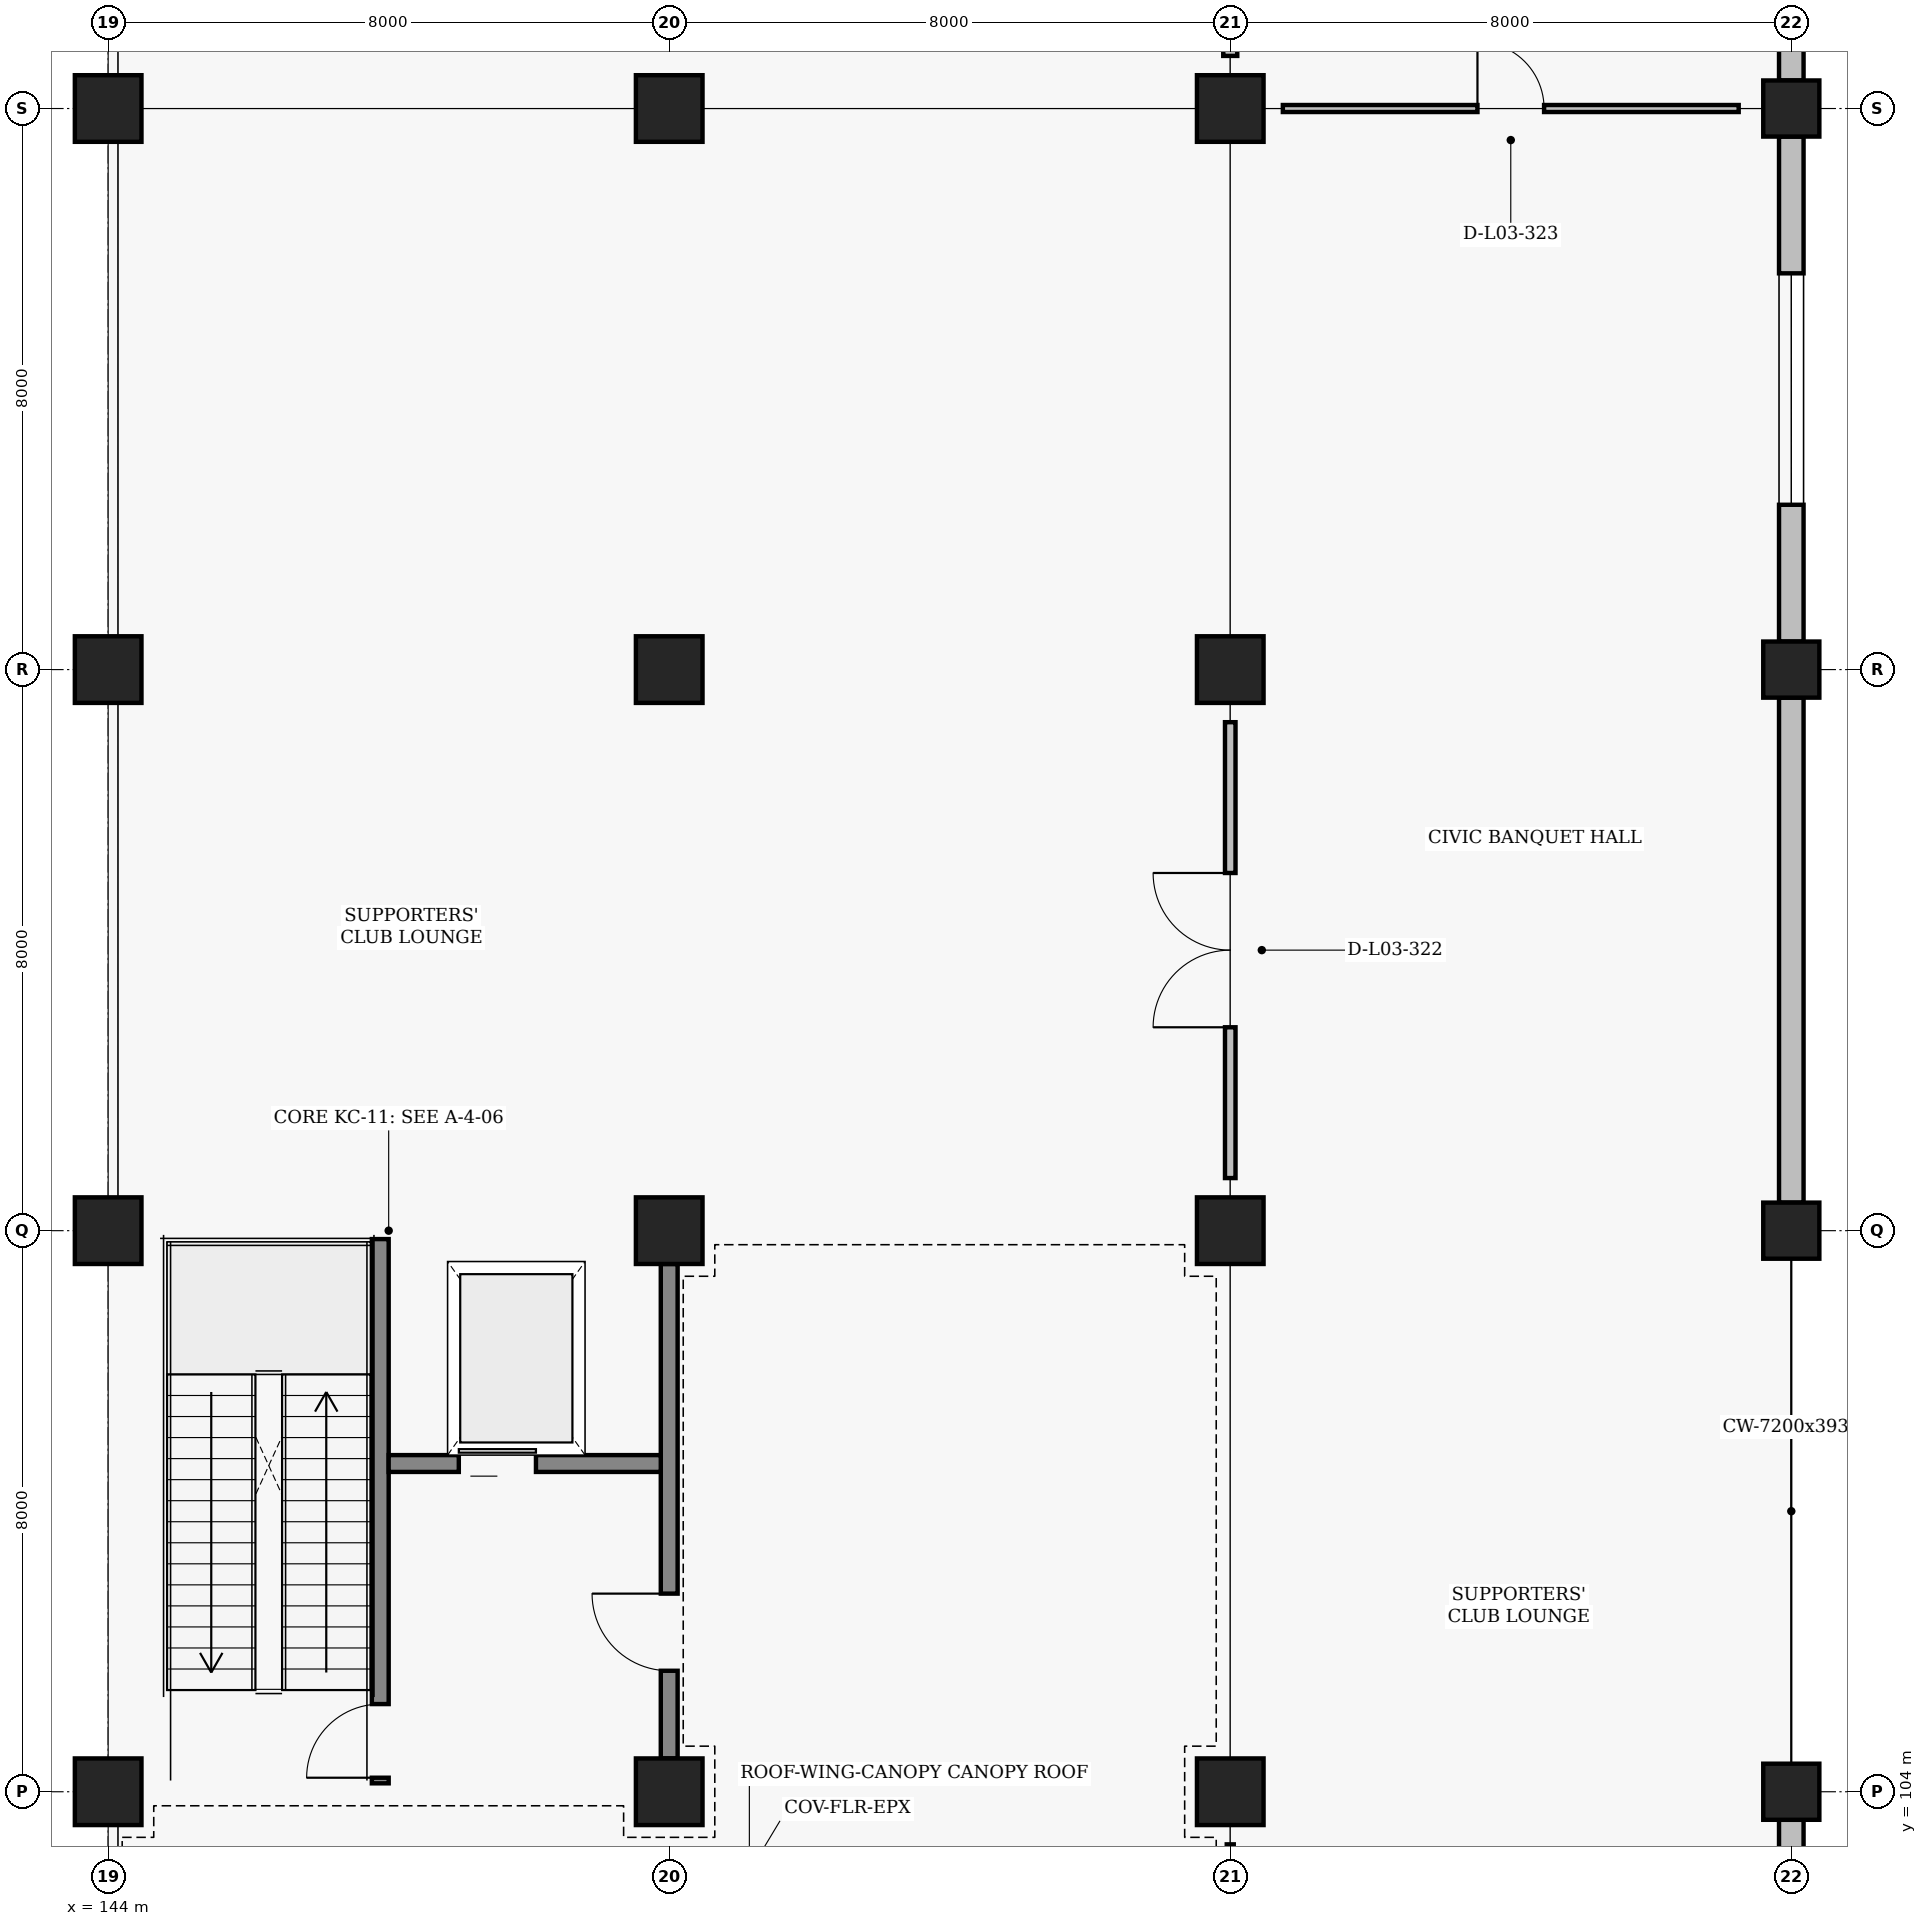
"""IFC4 building model, lengths in metres.
Left out: names, types, materials, properties, quantities, classifications, styles, units other than length and angle.
Written with IfcOpenShell. Run it as: python <this file> out.ifc"""

import sys

from ifc_helpers import new_model, si_unit, direction, frame, frame_2d, origin, origin_2d, place, context, subcontext, project, spatial, rectangle, extrude, element, fill, save


model = new_model("IFC4")
c1 = context("Model", 3, precision=1e-05, world=origin(), true_north=direction((0.0, 1.0)))
c2 = subcontext(c1, "Body", "Model", "MODEL_VIEW")
j1 = project(units=[si_unit("LENGTHUNIT", "METRE"), si_unit("PLANEANGLEUNIT", "RADIAN")], contexts=[c1])
p1 = place(None, origin())
s1 = spatial("IfcSite", under=j1, at=p1, CompositionType="ELEMENT")
p2 = place(p1, origin())
s2 = spatial("IfcBuilding", under=s1, at=p2, CompositionType="ELEMENT")
p3 = place(p2, frame((0.0, 0.0, 9.6)))
s3 = spatial("IfcBuildingStorey", under=s2, at=p3, CompositionType="ELEMENT", Elevation=9.6)
for number, where, z_axis, x_axis in (
    (1, (144.0, 104.0, 0.0), (0.0, 0.0, 1.0), (1.0, 0.0, 0.0)),
    (2, (144.0, 112.0, 0.0), (0.0, 0.0, 1.0), (1.0, 0.0, 0.0)),
    (3, (144.0, 120.0, 0.0), (0.0, 0.0, 1.0), (1.0, 0.0, 0.0)),
    (4, (144.0, 128.0, 0.0), (0.0, 0.0, 1.0), (1.0, 0.0, 0.0)),
    (5, (152.0, 104.0, 0.0), (0.0, 0.0, 1.0), (1.0, 0.0, 0.0)),
    (6, (152.0, 112.0, 0.0), (0.0, 0.0, 1.0), (1.0, 0.0, 0.0)),
    (7, (152.0, 120.0, 0.0), (0.0, 0.0, 1.0), (1.0, 0.0, 0.0)),
    (8, (152.0, 128.0, 0.0), (0.0, 0.0, 1.0), (1.0, 0.0, 0.0)),
    (9, (160.0, 104.0, 0.0), (0.0, 0.0, 1.0), (1.0, 0.0, 0.0)),
    (10, (160.0, 112.0, 0.0), (0.0, 0.0, 1.0), (1.0, 0.0, 0.0)),
    (11, (160.0, 120.0, 0.0), (0.0, 0.0, 1.0), (1.0, 0.0, 0.0)),
    (12, (160.0, 128.0, 0.0), (0.0, 0.0, 1.0), (1.0, 0.0, 0.0)),
):
    element("IfcColumn", number, at=place(p3, frame(where, z_axis=z_axis, x_axis=x_axis)), inside=s3, PredefinedType="COLUMN", context=c2, shape_type="SweptSolid", body=[
        extrude(rectangle(XDim=0.95, YDim=0.95, at=origin_2d()), origin(), (0.0, 0.0, 1.0), 4.8),
    ])
for number, where, z_axis, x_axis in (
    (13, (168.0, 104.0, 0.0), (0.0, 0.0, 1.0), (1.0, 0.0, 0.0)),
    (14, (168.0, 112.0, 0.0), (0.0, 0.0, 1.0), (1.0, 0.0, 0.0)),
    (15, (168.0, 120.0, 0.0), (0.0, 0.0, 1.0), (1.0, 0.0, 0.0)),
    (16, (168.0, 128.0, 0.0), (0.0, 0.0, 1.0), (1.0, 0.0, 0.0)),
):
    element("IfcColumn", number, at=place(p3, frame(where, z_axis=z_axis, x_axis=x_axis)), inside=s3, PredefinedType="COLUMN", context=c2, shape_type="SweptSolid", body=[
        extrude(rectangle(XDim=0.8, YDim=0.8, at=origin_2d()), origin(), (0.0, 0.0, 1.0), 4.8),
    ])
p4 = place(p3, frame((168.0, 96.4, 0.0), z_axis=(0.0, 0.0, 1.0), x_axis=(0.0, 1.0, 0.0)))
e17 = element("IfcWall", 17, at=p4, inside=s3, PredefinedType="SOLIDWALL", context=c2, shape_type="SweptSolid", body=[
    extrude(rectangle(XDim=7.2, YDim=0.35, at=frame_2d((3.6, 0.0))), origin(), (0.0, 0.0, 1.0), 3.68),
])
p5 = place(p3, frame((168.0, 112.4, 0.0), z_axis=(0.0, 0.0, 1.0), x_axis=(0.0, 1.0, 0.0)))
e18 = element("IfcWall", 18, at=p5, inside=s3, PredefinedType="SOLIDWALL", context=c2, shape_type="SweptSolid", body=[
    extrude(rectangle(XDim=7.2, YDim=0.35, at=frame_2d((3.6, 0.0))), origin(), (0.0, 0.0, 1.0), 3.93),
])
p6 = place(p3, frame((168.0, 120.4, 0.0), z_axis=(0.0, 0.0, 1.0), x_axis=(0.0, 1.0, 0.0)))
e19 = element("IfcWall", 19, at=p6, inside=s3, PredefinedType="SOLIDWALL", context=c2, shape_type="SweptSolid", body=[
    extrude(rectangle(XDim=7.2, YDim=0.35, at=frame_2d((3.6, 0.0))), origin(), (0.0, 0.0, 1.0), 3.93),
])
p7 = place(p6, frame((1.95, 0.0, 0.95)))
e20 = element("IfcOpeningElement", 20, at=p7, cuts=e19, PredefinedType="OPENING", context=c2, shape_type="SweptSolid", body=[
    extrude(rectangle(XDim=3.3, YDim=2.2, at=frame_2d((1.65, 1.1))), frame((0.0, 0.185, 0.0), z_axis=(0.0, -1.0, 0.0), x_axis=(1.0, 0.0, 0.0)), (0.0, 0.0, 1.0), 0.37),
])
p8 = place(p3, frame((168.0, 128.4, 0.0), z_axis=(0.0, 0.0, 1.0), x_axis=(0.0, 1.0, 0.0)))
e21 = element("IfcWall", 21, at=p8, inside=s3, PredefinedType="SOLIDWALL", context=c2, shape_type="SweptSolid", body=[
    extrude(rectangle(XDim=7.2, YDim=0.35, at=frame_2d((3.6, 0.0))), origin(), (0.0, 0.0, 1.0), 3.79),
])
p9 = place(p3, frame((152.0, 104.475, 0.0), z_axis=(0.0, 0.0, 1.0), x_axis=(0.0, 1.0, 0.0)))
e22 = element("IfcWall", 22, at=p9, inside=s3, PredefinedType="SHEAR", context=c2, shape_type="SweptSolid", body=[
    extrude(rectangle(XDim=7.05, YDim=0.24, at=frame_2d((3.525, 0.0))), origin(), (0.0, 0.0, 1.0), 3.68),
])
p10 = place(p9, frame((1.25, 0.0, 0.0)))
e23 = element("IfcOpeningElement", 23, at=p10, cuts=e22, PredefinedType="OPENING", context=c2, shape_type="SweptSolid", body=[
    extrude(rectangle(XDim=1.1, YDim=2.2, at=frame_2d((0.55, 1.1))), frame((0.0, 0.13, 0.0), z_axis=(0.0, -1.0, 0.0), x_axis=(1.0, 0.0, 0.0)), (0.0, 0.0, 1.0), 0.26),
])
p11 = place(p3, frame((147.88, 104.12, 0.0), z_axis=(0.0, 0.0, 1.0), x_axis=(0.0, 1.0, 0.0)))
e24 = element("IfcWall", 24, at=p11, inside=s3, PredefinedType="SHEAR", context=c2, shape_type="SweptSolid", body=[
    extrude(rectangle(XDim=7.76, YDim=0.24, at=frame_2d((3.88, 0.0))), origin(), (0.0, 0.0, 1.0), 4.03),
])
p12 = place(p11, frame((0.08, 0.0, 0.0)))
e25 = element("IfcOpeningElement", 25, at=p12, cuts=e24, PredefinedType="OPENING", context=c2, shape_type="SweptSolid", body=[
    extrude(rectangle(XDim=1.05, YDim=2.15, at=frame_2d((0.525, 1.075))), frame((0.0, 0.13, 0.0), z_axis=(0.0, -1.0, 0.0), x_axis=(1.0, 0.0, 0.0)), (0.0, 0.0, 1.0), 0.26),
])
p13 = place(p3, frame((148.0, 108.68, 0.0), z_axis=(0.0, 0.0, 1.0), x_axis=(1.0, 0.0, 0.0)))
e26 = element("IfcWall", 26, at=p13, inside=s3, PredefinedType="SHEAR", context=c2, shape_type="SweptSolid", body=[
    extrude(rectangle(XDim=3.88, YDim=0.24, at=frame_2d((1.94, 0.0))), origin(), (0.0, 0.0, 1.0), 3.93),
])
p14 = place(p13, frame((1.0, 0.0, 0.0)))
e27 = element("IfcOpeningElement", 27, at=p14, cuts=e26, PredefinedType="OPENING", context=c2, shape_type="SweptSolid", body=[
    extrude(rectangle(XDim=1.1, YDim=2.15, at=frame_2d((0.55, 1.075))), frame((0.0, 0.13, 0.0), z_axis=(0.0, -1.0, 0.0), x_axis=(1.0, 0.0, 0.0)), (0.0, 0.0, 1.0), 0.26),
])
p15 = place(p3, frame((160.0, 128.75, 0.0), z_axis=(0.0, 0.0, 1.0), x_axis=(0.0, 1.0, 0.0)))
e28 = element("IfcWall", 28, at=p15, inside=s3, PredefinedType="PARTITIONING", context=c2, shape_type="SweptSolid", body=[
    extrude(rectangle(XDim=6.5, YDim=0.2, at=frame_2d((3.25, 0.0))), origin(), (0.0, 0.0, 1.0), 3.93),
])
p16 = place(p3, frame((160.0, 96.75, 0.0), z_axis=(0.0, 0.0, 1.0), x_axis=(0.0, 1.0, 0.0)))
e29 = element("IfcWall", 29, at=p16, inside=s3, PredefinedType="PARTITIONING", context=c2, shape_type="SweptSolid", body=[
    extrude(rectangle(XDim=6.5, YDim=0.1, at=frame_2d((3.25, 0.0))), origin(), (0.0, 0.0, 1.0), 3.93),
])
p17 = place(p16, frame((2.775, 0.0, 0.0)))
e30 = element("IfcOpeningElement", 30, at=p17, cuts=e29, PredefinedType="OPENING", context=c2, shape_type="SweptSolid", body=[
    extrude(rectangle(XDim=0.95, YDim=2.1, at=frame_2d((0.475, 1.05))), frame((0.0, 0.06, 0.0), z_axis=(0.0, -1.0, 0.0), x_axis=(1.0, 0.0, 0.0)), (0.0, 0.0, 1.0), 0.12),
])
p18 = place(p3, frame((160.0, 112.75, 0.0), z_axis=(0.0, 0.0, 1.0), x_axis=(0.0, 1.0, 0.0)))
e31 = element("IfcWall", 31, at=p18, inside=s3, PredefinedType="PARTITIONING", context=c2, shape_type="SweptSolid", body=[
    extrude(rectangle(XDim=6.5, YDim=0.15, at=frame_2d((3.25, 0.0))), origin(), (0.0, 0.0, 1.0), 3.93),
])
p19 = place(p18, frame((2.15, 0.0, 0.0)))
e32 = element("IfcOpeningElement", 32, at=p19, cuts=e31, PredefinedType="OPENING", context=c2, shape_type="SweptSolid", body=[
    extrude(rectangle(XDim=2.2, YDim=2.4, at=frame_2d((1.1, 1.2))), frame((0.0, 0.085, 0.0), z_axis=(0.0, -1.0, 0.0), x_axis=(1.0, 0.0, 0.0)), (0.0, 0.0, 1.0), 0.17),
])
p20 = place(p3, frame((160.75, 128.0, 0.0), z_axis=(0.0, 0.0, 1.0), x_axis=(1.0, 0.0, 0.0)))
e33 = element("IfcWall", 33, at=p20, inside=s3, PredefinedType="PARTITIONING", context=c2, shape_type="SweptSolid", body=[
    extrude(rectangle(XDim=6.5, YDim=0.1, at=frame_2d((3.25, 0.0))), origin(), (0.0, 0.0, 1.0), 3.93),
])
p21 = place(p20, frame((2.775, 0.0, 0.0)))
e34 = element("IfcOpeningElement", 34, at=p21, cuts=e33, PredefinedType="OPENING", context=c2, shape_type="SweptSolid", body=[
    extrude(rectangle(XDim=0.95, YDim=2.1, at=frame_2d((0.475, 1.05))), frame((0.0, 0.06, 0.0), z_axis=(0.0, -1.0, 0.0), x_axis=(1.0, 0.0, 0.0)), (0.0, 0.0, 1.0), 0.12),
])
p22 = place(p7, origin())
e35 = element("IfcWindow", 35, at=p22, inside=s3, PartitioningType="SINGLE_PANEL", PredefinedType="WINDOW", context=c2, shape_type="SweptSolid", body=[
    extrude(rectangle(XDim=3.3, YDim=2.2, at=frame_2d((1.65, 1.1))), frame((0.0, 0.03, 0.0), z_axis=(0.0, -1.0, 0.0), x_axis=(1.0, 0.0, 0.0)), (0.0, 0.0, 1.0), 0.06),
])
fill(e20, e35)
p23 = place(p10, origin())
e36 = element("IfcDoor", 36, at=p23, inside=s3, OperationType="SINGLE_SWING_RIGHT", PredefinedType="DOOR", context=c2, shape_type="SweptSolid", body=[
    extrude(rectangle(XDim=1.1, YDim=2.2, at=frame_2d((0.55, 1.1))), frame((0.0, 0.025, 0.0), z_axis=(0.0, -1.0, 0.0), x_axis=(1.0, 0.0, 0.0)), (0.0, 0.0, 1.0), 0.05),
])
fill(e23, e36)
p24 = place(p12, origin())
e37 = element("IfcDoor", 37, at=p24, inside=s3, OperationType="SINGLE_SWING_LEFT", PredefinedType="DOOR", context=c2, shape_type="SweptSolid", body=[
    extrude(rectangle(XDim=1.05, YDim=2.15, at=frame_2d((0.525, 1.075))), frame((0.0, 0.025, 0.0), z_axis=(0.0, -1.0, 0.0), x_axis=(1.0, 0.0, 0.0)), (0.0, 0.0, 1.0), 0.05),
])
fill(e25, e37)
p25 = place(p14, origin())
e38 = element("IfcDoor", 38, at=p25, inside=s3, OperationType="SLIDING_TO_LEFT", PredefinedType="DOOR", context=c2, shape_type="SweptSolid", body=[
    extrude(rectangle(XDim=1.1, YDim=2.15, at=frame_2d((0.55, 1.075))), frame((0.0, 0.025, 0.0), z_axis=(0.0, -1.0, 0.0), x_axis=(1.0, 0.0, 0.0)), (0.0, 0.0, 1.0), 0.05),
])
fill(e27, e38)
p26 = place(p19, origin())
e39 = element("IfcDoor", 39, at=p26, inside=s3, OperationType="DOUBLE_SWING_LEFT", PredefinedType="DOOR", context=c2, shape_type="SweptSolid", body=[
    extrude(rectangle(XDim=2.2, YDim=2.4, at=frame_2d((1.1, 1.2))), frame((0.0, 0.025, 0.0), z_axis=(0.0, -1.0, 0.0), x_axis=(1.0, 0.0, 0.0)), (0.0, 0.0, 1.0), 0.05),
])
fill(e32, e39)
p27 = place(p21, origin())
e40 = element("IfcDoor", 40, at=p27, inside=s3, OperationType="SINGLE_SWING_LEFT", PredefinedType="DOOR", context=c2, shape_type="SweptSolid", body=[
    extrude(rectangle(XDim=0.95, YDim=2.1, at=frame_2d((0.475, 1.05))), frame((0.0, 0.025, 0.0), z_axis=(0.0, -1.0, 0.0), x_axis=(1.0, 0.0, 0.0)), (0.0, 0.0, 1.0), 0.05),
])
fill(e34, e40)
save(model, sys.argv[1])
